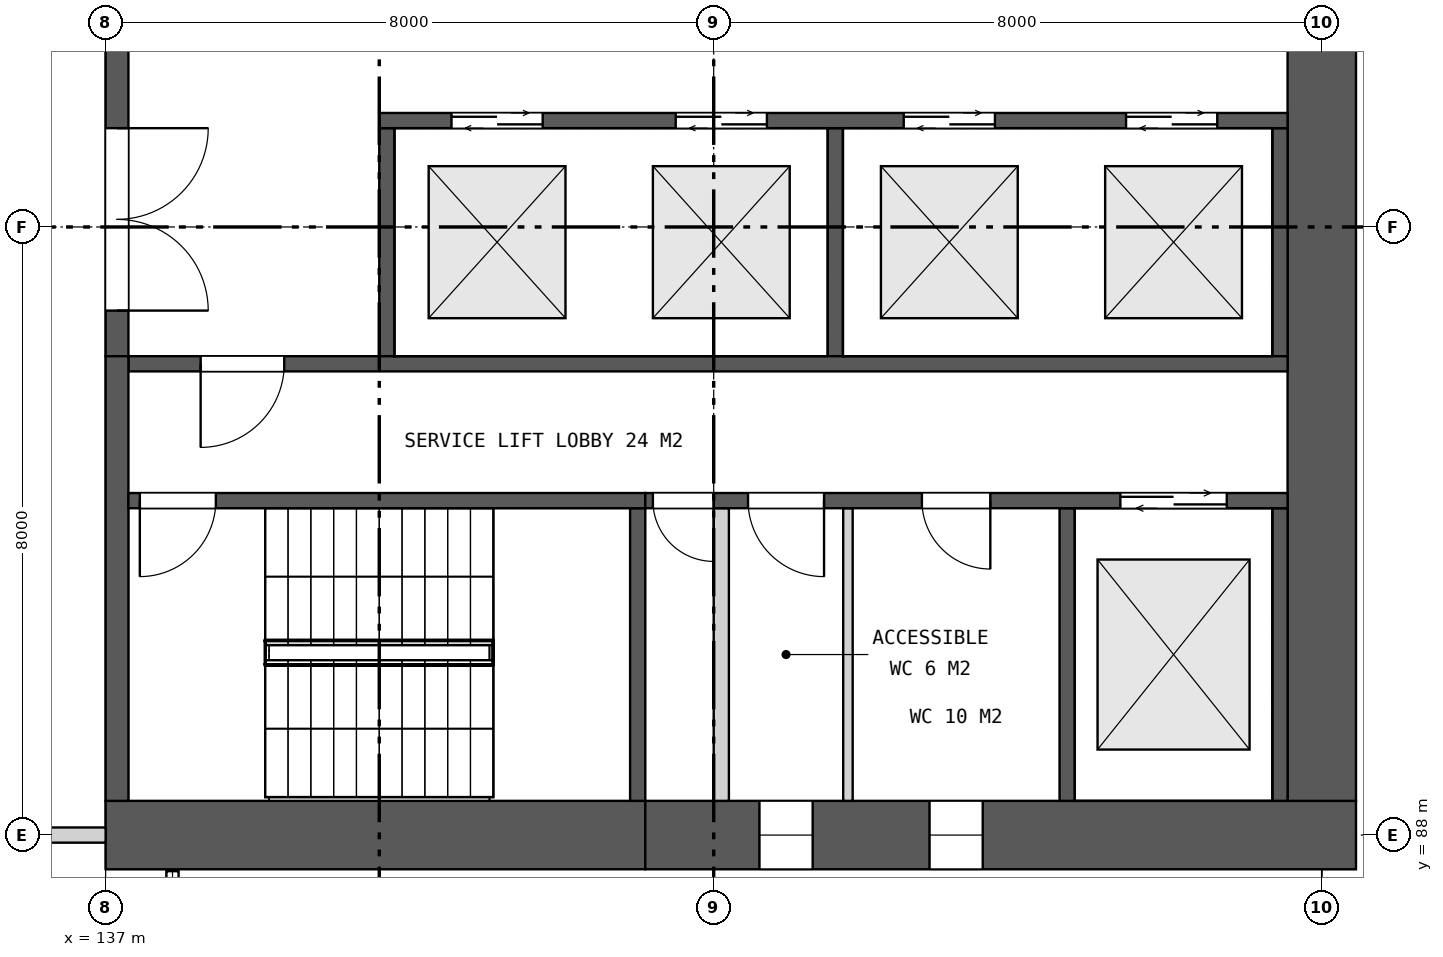
"""IFC4 building model, lengths in metres.
Left out: names, types, materials, properties, quantities, classifications, styles, units other than length and angle.
Written with IfcOpenShell. Run it as: python <this file> out.ifc"""

import sys

from ifc_helpers import new_model, si_unit, direction, frame, frame_2d, origin, place, context, subcontext, project, spatial, rectangle, extrude, element, fill, save


model = new_model("IFC4")
c1 = context("Model", 3, precision=1e-05, world=origin(), true_north=direction((0.0, 1.0)))
c2 = subcontext(c1, "Body", "Model", "MODEL_VIEW")
j1 = project(units=[si_unit("LENGTHUNIT", "METRE"), si_unit("PLANEANGLEUNIT", "RADIAN")], contexts=[c1])
p1 = place(None, origin())
s1 = spatial("IfcSite", under=j1, at=p1, CompositionType="ELEMENT")
p2 = place(p1, origin())
s2 = spatial("IfcBuilding", under=s1, at=p2, CompositionType="ELEMENT")
p3 = place(p2, frame((0.0, 0.0, 10.0)))
s3 = spatial("IfcBuildingStorey", under=s2, at=p3, CompositionType="ELEMENT", Elevation=10.0)
p4 = place(p3, frame((137.0, 88.0, 0.0), z_axis=(0.0, 0.0, 1.0), x_axis=(1.0, 0.0, 0.0)))
e1 = element("IfcWall", 1, at=p4, inside=s3, PredefinedType="SHEAR", context=c2, shape_type="SweptSolid", body=[
    extrude(rectangle(XDim=7.1, YDim=0.9, at=frame_2d((3.55, 0.0))), origin(), (0.0, 0.0, 1.0), 7.5),
])
p5 = place(p3, frame((144.1, 88.0, 0.0), z_axis=(0.0, 0.0, 1.0), x_axis=(1.0, 0.0, 0.0)))
e2 = element("IfcWall", 2, at=p5, inside=s3, PredefinedType="SHEAR", context=c2, shape_type="SweptSolid", body=[
    extrude(rectangle(XDim=9.35, YDim=0.9, at=frame_2d((4.675, 0.0))), origin(), (0.0, 0.0, 1.0), 7.5),
])
p6 = place(p5, frame((1.502, 0.0, 1.5)))
e3 = element("IfcOpeningElement", 3, at=p6, cuts=e2, PredefinedType="OPENING", context=c2, shape_type="SweptSolid", body=[
    extrude(rectangle(XDim=0.7, YDim=0.9, at=frame_2d((0.35, 0.45))), frame((0.0, 0.46, 0.0), z_axis=(0.0, -1.0, 0.0), x_axis=(1.0, 0.0, 0.0)), (0.0, 0.0, 1.0), 0.92),
])
p7 = place(p5, frame((3.739, 0.0, 1.5)))
e4 = element("IfcOpeningElement", 4, at=p7, cuts=e2, PredefinedType="OPENING", context=c2, shape_type="SweptSolid", body=[
    extrude(rectangle(XDim=0.7, YDim=0.9, at=frame_2d((0.35, 0.45))), frame((0.0, 0.46, 0.0), z_axis=(0.0, -1.0, 0.0), x_axis=(1.0, 0.0, 0.0)), (0.0, 0.0, 1.0), 0.92),
])
p8 = place(p3, frame((153.0, 88.45, 0.0), z_axis=(0.0, 0.0, 1.0), x_axis=(0.0, 1.0, 0.0)))
e5 = element("IfcWall", 5, at=p8, inside=s3, PredefinedType="SHEAR", context=c2, shape_type="SweptSolid", body=[
    extrude(rectangle(XDim=23.1, YDim=0.9, at=frame_2d((11.55, 0.0))), origin(), (0.0, 0.0, 1.0), 7.5),
])
p9 = place(p8, frame((10.35, 0.0, 0.0)))
e6 = element("IfcOpeningElement", 6, at=p9, cuts=e5, PredefinedType="OPENING", context=c2, shape_type="SweptSolid", body=[
    extrude(rectangle(XDim=2.4, YDim=2.4, at=frame_2d((1.2, 1.2))), frame((0.0, 0.46, 0.0), z_axis=(0.0, -1.0, 0.0), x_axis=(1.0, 0.0, 0.0)), (0.0, 0.0, 1.0), 0.92),
])
p10 = place(p3, frame((137.15, 94.3, 0.0), z_axis=(0.0, 0.0, 1.0), x_axis=(0.0, 1.0, 0.0)))
e7 = element("IfcWall", 7, at=p10, inside=s3, PredefinedType="SHEAR", context=c2, shape_type="SweptSolid", body=[
    extrude(rectangle(XDim=11.4, YDim=0.3, at=frame_2d((5.7, 0.0))), origin(), (0.0, 0.0, 1.0), 7.5),
])
p11 = place(p10, frame((0.6, 0.0, 0.0)))
e8 = element("IfcOpeningElement", 8, at=p11, cuts=e7, PredefinedType="OPENING", context=c2, shape_type="SweptSolid", body=[
    extrude(rectangle(XDim=2.4, YDim=2.4, at=frame_2d((1.2, 1.2))), frame((0.0, 0.16, 0.0), z_axis=(0.0, -1.0, 0.0), x_axis=(1.0, 0.0, 0.0)), (0.0, 0.0, 1.0), 0.32),
])
p12 = place(p10, frame((4.5, 0.0, 0.0)))
e9 = element("IfcOpeningElement", 9, at=p12, cuts=e7, PredefinedType="OPENING", context=c2, shape_type="SweptSolid", body=[
    extrude(rectangle(XDim=2.4, YDim=2.4, at=frame_2d((1.2, 1.2))), frame((0.0, 0.16, 0.0), z_axis=(0.0, -1.0, 0.0), x_axis=(1.0, 0.0, 0.0)), (0.0, 0.0, 1.0), 0.32),
])
p13 = place(p10, frame((8.4, 0.0, 0.0)))
e10 = element("IfcOpeningElement", 10, at=p13, cuts=e7, PredefinedType="OPENING", context=c2, shape_type="SweptSolid", body=[
    extrude(rectangle(XDim=2.4, YDim=2.4, at=frame_2d((1.2, 1.2))), frame((0.0, 0.16, 0.0), z_axis=(0.0, -1.0, 0.0), x_axis=(1.0, 0.0, 0.0)), (0.0, 0.0, 1.0), 0.32),
])
for number, where, z_axis, x_axis in (
    (11, (140.7, 94.3, 0.0), (0.0, 0.0, 1.0), (0.0, 1.0, 0.0)),
    (12, (146.6, 94.3, 0.0), (0.0, 0.0, 1.0), (0.0, 1.0, 0.0)),
    (13, (152.45, 94.3, 0.0), (0.0, 0.0, 1.0), (0.0, 1.0, 0.0)),
):
    element("IfcWall", number, at=place(p3, frame(where, z_axis=z_axis, x_axis=x_axis)), inside=s3, PredefinedType="SHEAR", context=c2, shape_type="SweptSolid", body=[
        extrude(rectangle(XDim=3.0, YDim=0.2, at=frame_2d((1.5, 0.0))), origin(), (0.0, 0.0, 1.0), 7.5),
    ])
p14 = place(p3, frame((140.6, 97.4, 0.0), z_axis=(0.0, 0.0, 1.0), x_axis=(1.0, 0.0, 0.0)))
e14 = element("IfcWall", 14, at=p14, inside=s3, PredefinedType="SHEAR", context=c2, shape_type="SweptSolid", body=[
    extrude(rectangle(XDim=11.95, YDim=0.2, at=frame_2d((5.975, 0.0))), origin(), (0.0, 0.0, 1.0), 7.5),
])
p15 = place(p14, frame((0.95, 0.0, 0.0)))
e15 = element("IfcOpeningElement", 15, at=p15, cuts=e14, PredefinedType="OPENING", context=c2, shape_type="SweptSolid", body=[
    extrude(rectangle(XDim=1.2, YDim=2.1, at=frame_2d((0.6, 1.05))), frame((0.0, 0.11, 0.0), z_axis=(0.0, -1.0, 0.0), x_axis=(1.0, 0.0, 0.0)), (0.0, 0.0, 1.0), 0.22),
])
p16 = place(p14, frame((3.9, 0.0, 0.0)))
e16 = element("IfcOpeningElement", 16, at=p16, cuts=e14, PredefinedType="OPENING", context=c2, shape_type="SweptSolid", body=[
    extrude(rectangle(XDim=1.2, YDim=2.1, at=frame_2d((0.6, 1.05))), frame((0.0, 0.11, 0.0), z_axis=(0.0, -1.0, 0.0), x_axis=(1.0, 0.0, 0.0)), (0.0, 0.0, 1.0), 0.22),
])
p17 = place(p14, frame((6.9, 0.0, 0.0)))
e17 = element("IfcOpeningElement", 17, at=p17, cuts=e14, PredefinedType="OPENING", context=c2, shape_type="SweptSolid", body=[
    extrude(rectangle(XDim=1.2, YDim=2.1, at=frame_2d((0.6, 1.05))), frame((0.0, 0.11, 0.0), z_axis=(0.0, -1.0, 0.0), x_axis=(1.0, 0.0, 0.0)), (0.0, 0.0, 1.0), 0.22),
])
p18 = place(p14, frame((9.825, 0.0, 0.0)))
e18 = element("IfcOpeningElement", 18, at=p18, cuts=e14, PredefinedType="OPENING", context=c2, shape_type="SweptSolid", body=[
    extrude(rectangle(XDim=1.2, YDim=2.1, at=frame_2d((0.6, 1.05))), frame((0.0, 0.11, 0.0), z_axis=(0.0, -1.0, 0.0), x_axis=(1.0, 0.0, 0.0)), (0.0, 0.0, 1.0), 0.22),
])
p19 = place(p3, frame((137.3, 94.2, 0.0), z_axis=(0.0, 0.0, 1.0), x_axis=(1.0, 0.0, 0.0)))
e19 = element("IfcWall", 19, at=p19, inside=s3, PredefinedType="SHEAR", context=c2, shape_type="SweptSolid", body=[
    extrude(rectangle(XDim=15.25, YDim=0.2, at=frame_2d((7.625, 0.0))), origin(), (0.0, 0.0, 1.0), 7.5),
])
p20 = place(p19, frame((0.95, 0.0, 0.0)))
e20 = element("IfcOpeningElement", 20, at=p20, cuts=e19, PredefinedType="OPENING", context=c2, shape_type="SweptSolid", body=[
    extrude(rectangle(XDim=1.1, YDim=2.1, at=frame_2d((0.55, 1.05))), frame((0.0, 0.11, 0.0), z_axis=(0.0, -1.0, 0.0), x_axis=(1.0, 0.0, 0.0)), (0.0, 0.0, 1.0), 0.22),
])
p21 = place(p3, frame((137.15, 88.45, 0.0), z_axis=(0.0, 0.0, 1.0), x_axis=(0.0, 1.0, 0.0)))
e21 = element("IfcWall", 21, at=p21, inside=s3, PredefinedType="SHEAR", context=c2, shape_type="SweptSolid", body=[
    extrude(rectangle(XDim=5.85, YDim=0.3, at=frame_2d((2.925, 0.0))), origin(), (0.0, 0.0, 1.0), 7.5),
])
for number, where, z_axis, x_axis in (
    (22, (144.0, 88.45, 0.0), (0.0, 0.0, 1.0), (0.0, 1.0, 0.0)),
    (23, (149.65, 88.45, 0.0), (0.0, 0.0, 1.0), (0.0, 1.0, 0.0)),
    (24, (152.45, 88.45, 0.0), (0.0, 0.0, 1.0), (0.0, 1.0, 0.0)),
):
    element("IfcWall", number, at=place(p3, frame(where, z_axis=z_axis, x_axis=x_axis)), inside=s3, PredefinedType="SHEAR", context=c2, shape_type="SweptSolid", body=[
        extrude(rectangle(XDim=3.85, YDim=0.2, at=frame_2d((1.925, 0.0))), origin(), (0.0, 0.0, 1.0), 7.5),
    ])
p22 = place(p3, frame((145.1, 88.45, 0.0), z_axis=(0.0, 0.0, 1.0), x_axis=(0.0, 1.0, 0.0)))
e25 = element("IfcWall", 25, at=p22, inside=s3, PredefinedType="PARTITIONING", context=c2, shape_type="SweptSolid", body=[
    extrude(rectangle(XDim=3.85, YDim=0.2, at=frame_2d((1.925, 0.0))), origin(), (0.0, 0.0, 1.0), 7.5),
])
p23 = place(p3, frame((146.766, 88.45, 0.0), z_axis=(0.0, 0.0, 1.0), x_axis=(0.0, 1.0, 0.0)))
e26 = element("IfcWall", 26, at=p23, inside=s3, PredefinedType="PARTITIONING", context=c2, shape_type="SweptSolid", body=[
    extrude(rectangle(XDim=3.85, YDim=0.125, at=frame_2d((1.925, 0.0))), origin(), (0.0, 0.0, 1.0), 7.5),
])
p24 = place(p3, frame((137.3, 92.4, 0.0), z_axis=(0.0, 0.0, 1.0), x_axis=(1.0, 0.0, 0.0)))
e27 = element("IfcWall", 27, at=p24, inside=s3, PredefinedType="SHEAR", context=c2, shape_type="SweptSolid", body=[
    extrude(rectangle(XDim=6.8, YDim=0.2, at=frame_2d((3.4, 0.0))), origin(), (0.0, 0.0, 1.0), 7.5),
])
p25 = place(p24, frame((0.15, 0.0, 0.0)))
e28 = element("IfcOpeningElement", 28, at=p25, cuts=e27, PredefinedType="OPENING", context=c2, shape_type="SweptSolid", body=[
    extrude(rectangle(XDim=1.0, YDim=2.1, at=frame_2d((0.5, 1.05))), frame((0.0, 0.11, 0.0), z_axis=(0.0, -1.0, 0.0), x_axis=(1.0, 0.0, 0.0)), (0.0, 0.0, 1.0), 0.22),
])
p26 = place(p3, frame((144.1, 92.4, 0.0), z_axis=(0.0, 0.0, 1.0), x_axis=(1.0, 0.0, 0.0)))
e29 = element("IfcWall", 29, at=p26, inside=s3, PredefinedType="SHEAR", context=c2, shape_type="SweptSolid", body=[
    extrude(rectangle(XDim=8.45, YDim=0.2, at=frame_2d((4.225, 0.0))), origin(), (0.0, 0.0, 1.0), 7.5),
])
p27 = place(p26, frame((0.1, 0.0, 0.0)))
e30 = element("IfcOpeningElement", 30, at=p27, cuts=e29, PredefinedType="OPENING", context=c2, shape_type="SweptSolid", body=[
    extrude(rectangle(XDim=0.8, YDim=2.1, at=frame_2d((0.4, 1.05))), frame((0.0, 0.11, 0.0), z_axis=(0.0, -1.0, 0.0), x_axis=(1.0, 0.0, 0.0)), (0.0, 0.0, 1.0), 0.22),
])
p28 = place(p26, frame((1.352, 0.0, 0.0)))
e31 = element("IfcOpeningElement", 31, at=p28, cuts=e29, PredefinedType="OPENING", context=c2, shape_type="SweptSolid", body=[
    extrude(rectangle(XDim=1.0, YDim=2.1, at=frame_2d((0.5, 1.05))), frame((0.0, 0.11, 0.0), z_axis=(0.0, -1.0, 0.0), x_axis=(1.0, 0.0, 0.0)), (0.0, 0.0, 1.0), 0.22),
])
p29 = place(p26, frame((3.639, 0.0, 0.0)))
e32 = element("IfcOpeningElement", 32, at=p29, cuts=e29, PredefinedType="OPENING", context=c2, shape_type="SweptSolid", body=[
    extrude(rectangle(XDim=0.9, YDim=2.1, at=frame_2d((0.45, 1.05))), frame((0.0, 0.11, 0.0), z_axis=(0.0, -1.0, 0.0), x_axis=(1.0, 0.0, 0.0)), (0.0, 0.0, 1.0), 0.22),
])
p30 = place(p26, frame((6.25, 0.0, 0.0)))
e33 = element("IfcOpeningElement", 33, at=p30, cuts=e29, PredefinedType="OPENING", context=c2, shape_type="SweptSolid", body=[
    extrude(rectangle(XDim=1.4, YDim=2.1, at=frame_2d((0.7, 1.05))), frame((0.0, 0.11, 0.0), z_axis=(0.0, -1.0, 0.0), x_axis=(1.0, 0.0, 0.0)), (0.0, 0.0, 1.0), 0.22),
])
p31 = place(p3, frame((129.6, 88.0, 0.0), z_axis=(0.0, 0.0, 1.0), x_axis=(1.0, 0.0, 0.0)))
e34 = element("IfcWall", 34, at=p31, inside=s3, PredefinedType="PARTITIONING", context=c2, shape_type="SweptSolid", body=[
    extrude(rectangle(XDim=7.4, YDim=0.2, at=frame_2d((3.7, 0.0))), origin(), (0.0, 0.0, 1.0), 6.551),
])
p32 = place(p31, frame((2.2, 0.0, 0.0)))
e35 = element("IfcOpeningElement", 35, at=p32, cuts=e34, PredefinedType="OPENING", context=c2, shape_type="SweptSolid", body=[
    extrude(rectangle(XDim=2.4, YDim=2.4, at=frame_2d((1.2, 1.2))), frame((0.0, 0.11, 0.0), z_axis=(0.0, -1.0, 0.0), x_axis=(1.0, 0.0, 0.0)), (0.0, 0.0, 1.0), 0.22),
])
p33 = place(p6, origin())
e36 = element("IfcWindow", 36, at=p33, inside=s3, PartitioningType="SINGLE_PANEL", PredefinedType="WINDOW", context=c2, shape_type="SweptSolid", body=[
    extrude(rectangle(XDim=0.7, YDim=0.9, at=frame_2d((0.35, 0.45))), frame((0.0, 0.03, 0.0), z_axis=(0.0, -1.0, 0.0), x_axis=(1.0, 0.0, 0.0)), (0.0, 0.0, 1.0), 0.06),
])
fill(e3, e36)
p34 = place(p7, origin())
e37 = element("IfcWindow", 37, at=p34, inside=s3, PartitioningType="SINGLE_PANEL", PredefinedType="WINDOW", context=c2, shape_type="SweptSolid", body=[
    extrude(rectangle(XDim=0.7, YDim=0.9, at=frame_2d((0.35, 0.45))), frame((0.0, 0.03, 0.0), z_axis=(0.0, -1.0, 0.0), x_axis=(1.0, 0.0, 0.0)), (0.0, 0.0, 1.0), 0.06),
])
fill(e4, e37)
p35 = place(p11, frame((2.4, 0.0, 0.0), z_axis=(0.0, 0.0, 1.0), x_axis=(-1.0, 0.0, 0.0)))
e38 = element("IfcDoor", 38, at=p35, inside=s3, OperationType="DOUBLE_DOOR_SINGLE_SWING", PredefinedType="DOOR", context=c2, shape_type="SweptSolid", body=[
    extrude(rectangle(XDim=2.4, YDim=2.4, at=frame_2d((1.2, 1.2))), frame((0.0, 0.025, 0.0), z_axis=(0.0, -1.0, 0.0), x_axis=(1.0, 0.0, 0.0)), (0.0, 0.0, 1.0), 0.05),
])
fill(e8, e38)
p36 = place(p15, origin())
e39 = element("IfcDoor", 39, at=p36, inside=s3, OperationType="DOUBLE_DOOR_SLIDING", PredefinedType="DOOR", context=c2, shape_type="SweptSolid", body=[
    extrude(rectangle(XDim=1.2, YDim=2.1, at=frame_2d((0.6, 1.05))), frame((0.0, 0.025, 0.0), z_axis=(0.0, -1.0, 0.0), x_axis=(1.0, 0.0, 0.0)), (0.0, 0.0, 1.0), 0.05),
])
fill(e15, e39)
p37 = place(p16, origin())
e40 = element("IfcDoor", 40, at=p37, inside=s3, OperationType="DOUBLE_DOOR_SLIDING", PredefinedType="DOOR", context=c2, shape_type="SweptSolid", body=[
    extrude(rectangle(XDim=1.2, YDim=2.1, at=frame_2d((0.6, 1.05))), frame((0.0, 0.025, 0.0), z_axis=(0.0, -1.0, 0.0), x_axis=(1.0, 0.0, 0.0)), (0.0, 0.0, 1.0), 0.05),
])
fill(e16, e40)
p38 = place(p17, origin())
e41 = element("IfcDoor", 41, at=p38, inside=s3, OperationType="DOUBLE_DOOR_SLIDING", PredefinedType="DOOR", context=c2, shape_type="SweptSolid", body=[
    extrude(rectangle(XDim=1.2, YDim=2.1, at=frame_2d((0.6, 1.05))), frame((0.0, 0.025, 0.0), z_axis=(0.0, -1.0, 0.0), x_axis=(1.0, 0.0, 0.0)), (0.0, 0.0, 1.0), 0.05),
])
fill(e17, e41)
p39 = place(p18, origin())
e42 = element("IfcDoor", 42, at=p39, inside=s3, OperationType="DOUBLE_DOOR_SLIDING", PredefinedType="DOOR", context=c2, shape_type="SweptSolid", body=[
    extrude(rectangle(XDim=1.2, YDim=2.1, at=frame_2d((0.6, 1.05))), frame((0.0, 0.025, 0.0), z_axis=(0.0, -1.0, 0.0), x_axis=(1.0, 0.0, 0.0)), (0.0, 0.0, 1.0), 0.05),
])
fill(e18, e42)
p40 = place(p20, frame((1.1, 0.0, 0.0), z_axis=(0.0, 0.0, 1.0), x_axis=(-1.0, 0.0, 0.0)))
e43 = element("IfcDoor", 43, at=p40, inside=s3, OperationType="SINGLE_SWING_RIGHT", PredefinedType="DOOR", context=c2, shape_type="SweptSolid", body=[
    extrude(rectangle(XDim=1.1, YDim=2.1, at=frame_2d((0.55, 1.05))), frame((0.0, 0.025, 0.0), z_axis=(0.0, -1.0, 0.0), x_axis=(1.0, 0.0, 0.0)), (0.0, 0.0, 1.0), 0.05),
])
fill(e20, e43)
p41 = place(p25, frame((1.0, 0.0, 0.0), z_axis=(0.0, 0.0, 1.0), x_axis=(-1.0, 0.0, 0.0)))
e44 = element("IfcDoor", 44, at=p41, inside=s3, OperationType="SINGLE_SWING_RIGHT", PredefinedType="DOOR", context=c2, shape_type="SweptSolid", body=[
    extrude(rectangle(XDim=1.0, YDim=2.1, at=frame_2d((0.5, 1.05))), frame((0.0, 0.025, 0.0), z_axis=(0.0, -1.0, 0.0), x_axis=(1.0, 0.0, 0.0)), (0.0, 0.0, 1.0), 0.05),
])
fill(e28, e44)
p42 = place(p27, frame((0.8, 0.0, 0.0), z_axis=(0.0, 0.0, 1.0), x_axis=(-1.0, 0.0, 0.0)))
e45 = element("IfcDoor", 45, at=p42, inside=s3, OperationType="SINGLE_SWING_LEFT", PredefinedType="DOOR", context=c2, shape_type="SweptSolid", body=[
    extrude(rectangle(XDim=0.8, YDim=2.1, at=frame_2d((0.4, 1.05))), frame((0.0, 0.025, 0.0), z_axis=(0.0, -1.0, 0.0), x_axis=(1.0, 0.0, 0.0)), (0.0, 0.0, 1.0), 0.05),
])
fill(e30, e45)
p43 = place(p28, frame((1.0, 0.0, 0.0), z_axis=(0.0, 0.0, 1.0), x_axis=(-1.0, 0.0, 0.0)))
e46 = element("IfcDoor", 46, at=p43, inside=s3, OperationType="SINGLE_SWING_LEFT", PredefinedType="DOOR", context=c2, shape_type="SweptSolid", body=[
    extrude(rectangle(XDim=1.0, YDim=2.1, at=frame_2d((0.5, 1.05))), frame((0.0, 0.025, 0.0), z_axis=(0.0, -1.0, 0.0), x_axis=(1.0, 0.0, 0.0)), (0.0, 0.0, 1.0), 0.05),
])
fill(e31, e46)
p44 = place(p29, frame((0.9, 0.0, 0.0), z_axis=(0.0, 0.0, 1.0), x_axis=(-1.0, 0.0, 0.0)))
e47 = element("IfcDoor", 47, at=p44, inside=s3, OperationType="SINGLE_SWING_LEFT", PredefinedType="DOOR", context=c2, shape_type="SweptSolid", body=[
    extrude(rectangle(XDim=0.9, YDim=2.1, at=frame_2d((0.45, 1.05))), frame((0.0, 0.025, 0.0), z_axis=(0.0, -1.0, 0.0), x_axis=(1.0, 0.0, 0.0)), (0.0, 0.0, 1.0), 0.05),
])
fill(e32, e47)
p45 = place(p30, origin())
e48 = element("IfcDoor", 48, at=p45, inside=s3, OperationType="DOUBLE_DOOR_SLIDING", PredefinedType="DOOR", context=c2, shape_type="SweptSolid", body=[
    extrude(rectangle(XDim=1.4, YDim=2.1, at=frame_2d((0.7, 1.05))), frame((0.0, 0.025, 0.0), z_axis=(0.0, -1.0, 0.0), x_axis=(1.0, 0.0, 0.0)), (0.0, 0.0, 1.0), 0.05),
])
fill(e33, e48)
save(model, sys.argv[1])
